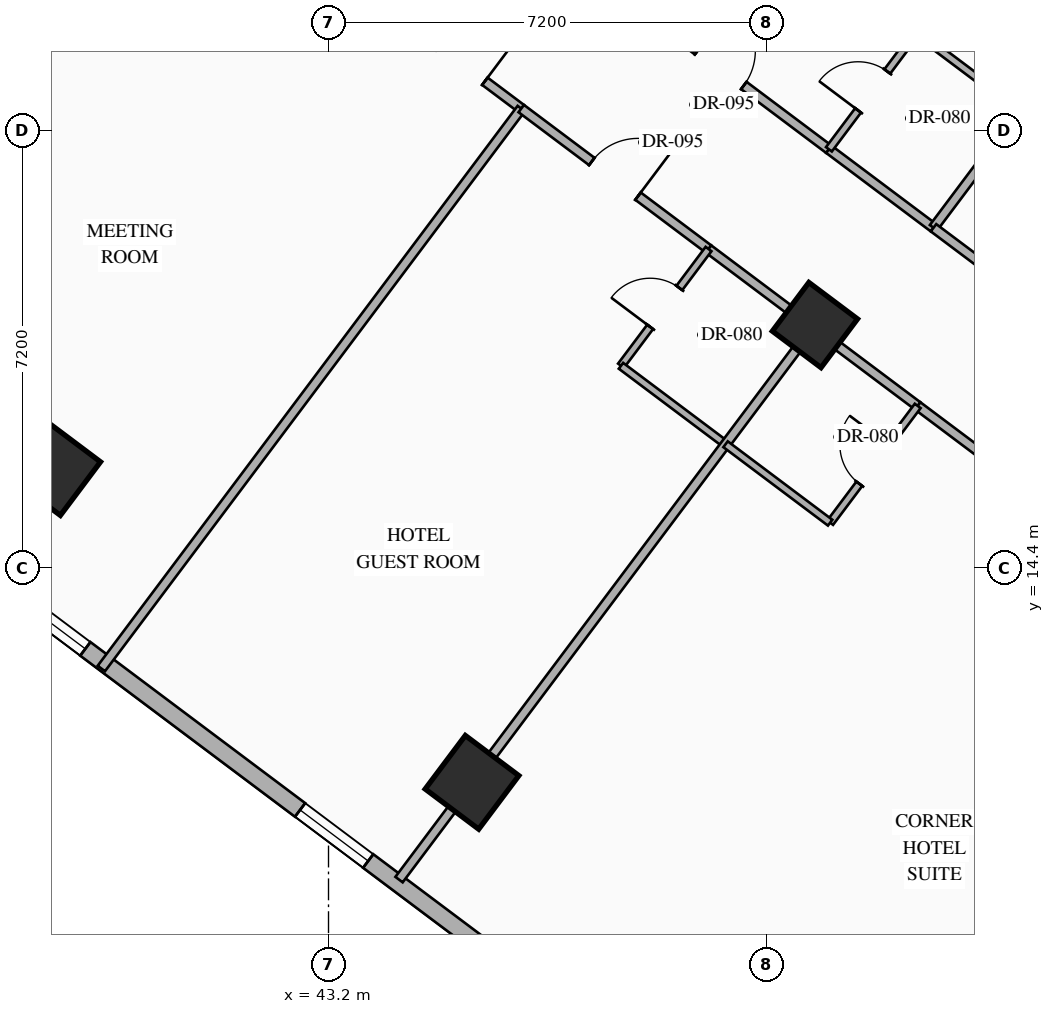
"""IFC4 building model, lengths in metres.
Left out: names, types, materials, properties, quantities, classifications, styles, units other than length and angle.
Written with IfcOpenShell. Run it as: python <this file> out.ifc"""

import sys

from ifc_helpers import new_model, si_unit, direction, frame, frame_2d, origin, origin_2d, place, context, subcontext, project, spatial, rectangle, hollow_rectangle, extrude, element, fill, save


model = new_model("IFC4")
c1 = context("Model", 3, precision=1e-05, world=origin(), true_north=direction((0.0, 1.0)))
c2 = subcontext(c1, "Body", "Model", "MODEL_VIEW")
j1 = project(units=[si_unit("LENGTHUNIT", "METRE"), si_unit("PLANEANGLEUNIT", "RADIAN")], contexts=[c1])
p1 = place(None, origin())
s1 = spatial("IfcSite", under=j1, at=p1, CompositionType="ELEMENT")
p2 = place(p1, origin())
s2 = spatial("IfcBuilding", under=s1, at=p2, CompositionType="ELEMENT")
p3 = place(p2, frame((0.0, 0.0, 39.95)))
s3 = spatial("IfcBuildingStorey", under=s2, at=p3, CompositionType="ELEMENT", Elevation=39.95)
for number, where, z_axis, x_axis in (
    (1, (38.68, 16.04, 0.0), (0.0, 0.0, 1.0), (0.8, -0.6, 0.0)),
    (2, (45.56, 10.88, 0.0), (0.0, 0.0, 1.0), (0.8, -0.6, 0.0)),
):
    element("IfcColumn", number, at=place(p3, frame(where, z_axis=z_axis, x_axis=x_axis)), inside=s3, PredefinedType="COLUMN", context=c2, shape_type="SweptSolid", body=[
        extrude(hollow_rectangle(XDim=1.1, YDim=1.1, WallThickness=0.04, at=origin_2d()), origin(), (0.0, 0.0, 1.0), 3.35),
    ])
p4 = place(p3, frame((51.2, 18.4, 0.0), z_axis=(0.0, 0.0, 1.0), x_axis=(0.799999996291, -0.600000004945, 0.0)))
e3 = element("IfcColumn", 3, at=p4, inside=s3, PredefinedType="COLUMN", context=c2, shape_type="SweptSolid", body=[
    extrude(hollow_rectangle(XDim=1.0, YDim=1.0, WallThickness=0.038, at=origin_2d()), origin(), (0.0, 0.0, 1.0), 3.35),
])
p5 = place(p3, frame((44.86, 40.73, 0.0), z_axis=(0.0, 0.0, 1.0), x_axis=(0.800006902154, -0.599990797017, 0.0)))
e4 = element("IfcWall", 4, at=p5, inside=s3, PredefinedType="STANDARD", context=c2, shape_type="SweptSolid", body=[
    extrude(rectangle(XDim=29.712, YDim=0.28, at=frame_2d((14.856, 0.0))), origin(), (0.0, 0.0, 1.0), 3.13),
])
p6 = place(p5, frame((14.249, 0.0, 0.0)))
e5 = element("IfcOpeningElement", 5, at=p6, cuts=e4, PredefinedType="OPENING", context=c2, shape_type="SweptSolid", body=[
    extrude(rectangle(XDim=1.1, YDim=2.2, at=frame_2d((0.55, 1.1))), frame((0.0, 0.15, 0.0), z_axis=(0.0, -1.0, 0.0), x_axis=(1.0, 0.0, 0.0)), (0.0, 0.0, 1.0), 0.3),
])
p7 = place(p5, frame((1.612, 0.0, 0.85)))
e6 = element("IfcOpeningElement", 6, at=p7, cuts=e4, PredefinedType="OPENING", context=c2, shape_type="SweptSolid", body=[
    extrude(rectangle(XDim=1.4, YDim=1.8, at=frame_2d((0.7, 0.9))), frame((0.0, 0.15, 0.0), z_axis=(0.0, -1.0, 0.0), x_axis=(1.0, 0.0, 0.0)), (0.0, 0.0, 1.0), 0.3),
])
p8 = place(p5, frame((5.667, 0.0, 0.85)))
e7 = element("IfcOpeningElement", 7, at=p8, cuts=e4, PredefinedType="OPENING", context=c2, shape_type="SweptSolid", body=[
    extrude(rectangle(XDim=1.4, YDim=1.8, at=frame_2d((0.7, 0.9))), frame((0.0, 0.15, 0.0), z_axis=(0.0, -1.0, 0.0), x_axis=(1.0, 0.0, 0.0)), (0.0, 0.0, 1.0), 0.3),
])
p9 = place(p5, frame((9.912, 0.0, 0.85)))
e8 = element("IfcOpeningElement", 8, at=p9, cuts=e4, PredefinedType="OPENING", context=c2, shape_type="SweptSolid", body=[
    extrude(rectangle(XDim=1.4, YDim=1.8, at=frame_2d((0.7, 0.9))), frame((0.0, 0.15, 0.0), z_axis=(0.0, -1.0, 0.0), x_axis=(1.0, 0.0, 0.0)), (0.0, 0.0, 1.0), 0.3),
])
p10 = place(p5, frame((19.743, 0.0, 0.85)))
e9 = element("IfcOpeningElement", 9, at=p10, cuts=e4, PredefinedType="OPENING", context=c2, shape_type="SweptSolid", body=[
    extrude(rectangle(XDim=1.4, YDim=1.8, at=frame_2d((0.7, 0.9))), frame((0.0, 0.15, 0.0), z_axis=(0.0, -1.0, 0.0), x_axis=(1.0, 0.0, 0.0)), (0.0, 0.0, 1.0), 0.3),
])
p11 = place(p5, frame((22.645, 0.0, 0.85)))
e10 = element("IfcOpeningElement", 10, at=p11, cuts=e4, PredefinedType="OPENING", context=c2, shape_type="SweptSolid", body=[
    extrude(rectangle(XDim=1.4, YDim=1.8, at=frame_2d((0.7, 0.9))), frame((0.0, 0.15, 0.0), z_axis=(0.0, -1.0, 0.0), x_axis=(1.0, 0.0, 0.0)), (0.0, 0.0, 1.0), 0.3),
])
p12 = place(p5, frame((26.7, 0.0, 0.85)))
e11 = element("IfcOpeningElement", 11, at=p12, cuts=e4, PredefinedType="OPENING", context=c2, shape_type="SweptSolid", body=[
    extrude(rectangle(XDim=1.4, YDim=1.8, at=frame_2d((0.7, 0.9))), frame((0.0, 0.15, 0.0), z_axis=(0.0, -1.0, 0.0), x_axis=(1.0, 0.0, 0.0)), (0.0, 0.0, 1.0), 0.3),
])
p13 = place(p3, frame((53.318, 2.487, 0.0), z_axis=(0.0, 0.0, 1.0), x_axis=(-0.800004174678, 0.599994433723, 0.0)))
e12 = element("IfcWall", 12, at=p13, inside=s3, PredefinedType="STANDARD", context=c2, shape_type="SweptSolid", body=[
    extrude(rectangle(XDim=35.089, YDim=0.28, at=frame_2d((17.544, 0.0))), origin(), (0.0, 0.0, 1.0), 3.13),
])
p14 = place(p13, frame((1.931, 0.0, 0.85)))
e13 = element("IfcOpeningElement", 13, at=p14, cuts=e12, PredefinedType="OPENING", context=c2, shape_type="SweptSolid", body=[
    extrude(rectangle(XDim=1.4, YDim=1.8, at=frame_2d((0.7, 0.9))), frame((0.0, 0.15, 0.0), z_axis=(0.0, -1.0, 0.0), x_axis=(1.0, 0.0, 0.0)), (0.0, 0.0, 1.0), 0.3),
])
p15 = place(p13, frame((6.819, 0.0, 0.85)))
e14 = element("IfcOpeningElement", 14, at=p15, cuts=e12, PredefinedType="OPENING", context=c2, shape_type="SweptSolid", body=[
    extrude(rectangle(XDim=1.4, YDim=1.8, at=frame_2d((0.7, 0.9))), frame((0.0, 0.15, 0.0), z_axis=(0.0, -1.0, 0.0), x_axis=(1.0, 0.0, 0.0)), (0.0, 0.0, 1.0), 0.3),
])
p16 = place(p13, frame((11.832, 0.0, 0.85)))
e15 = element("IfcOpeningElement", 15, at=p16, cuts=e12, PredefinedType="OPENING", context=c2, shape_type="SweptSolid", body=[
    extrude(rectangle(XDim=1.4, YDim=1.8, at=frame_2d((0.7, 0.9))), frame((0.0, 0.15, 0.0), z_axis=(0.0, -1.0, 0.0), x_axis=(1.0, 0.0, 0.0)), (0.0, 0.0, 1.0), 0.3),
])
p17 = place(p13, frame((17.647, 0.0, 0.85)))
e16 = element("IfcOpeningElement", 16, at=p17, cuts=e12, PredefinedType="OPENING", context=c2, shape_type="SweptSolid", body=[
    extrude(rectangle(XDim=1.4, YDim=1.8, at=frame_2d((0.7, 0.9))), frame((0.0, 0.15, 0.0), z_axis=(0.0, -1.0, 0.0), x_axis=(1.0, 0.0, 0.0)), (0.0, 0.0, 1.0), 0.3),
])
p18 = place(p13, frame((21.857, 0.0, 0.85)))
e17 = element("IfcOpeningElement", 17, at=p18, cuts=e12, PredefinedType="OPENING", context=c2, shape_type="SweptSolid", body=[
    extrude(rectangle(XDim=1.4, YDim=1.8, at=frame_2d((0.7, 0.9))), frame((0.0, 0.15, 0.0), z_axis=(0.0, -1.0, 0.0), x_axis=(1.0, 0.0, 0.0)), (0.0, 0.0, 1.0), 0.3),
])
p19 = place(p13, frame((26.87, 0.0, 0.85)))
e18 = element("IfcOpeningElement", 18, at=p19, cuts=e12, PredefinedType="OPENING", context=c2, shape_type="SweptSolid", body=[
    extrude(rectangle(XDim=1.4, YDim=1.8, at=frame_2d((0.7, 0.9))), frame((0.0, 0.15, 0.0), z_axis=(0.0, -1.0, 0.0), x_axis=(1.0, 0.0, 0.0)), (0.0, 0.0, 1.0), 0.3),
])
p20 = place(p13, frame((31.757, 0.0, 0.85)))
e19 = element("IfcOpeningElement", 19, at=p20, cuts=e12, PredefinedType="OPENING", context=c2, shape_type="SweptSolid", body=[
    extrude(rectangle(XDim=1.4, YDim=1.8, at=frame_2d((0.7, 0.9))), frame((0.0, 0.15, 0.0), z_axis=(0.0, -1.0, 0.0), x_axis=(1.0, 0.0, 0.0)), (0.0, 0.0, 1.0), 0.3),
])
p21 = place(p3, frame((43.037, 24.46, 0.0), z_axis=(0.0, 0.0, 1.0), x_axis=(0.799971872363, -0.600037501685, 0.0)))
e20 = element("IfcWall", 20, at=p21, inside=s3, PredefinedType="PARTITIONING", context=c2, shape_type="SweptSolid", body=[
    extrude(rectangle(XDim=4.167, YDim=0.15, at=frame_2d((2.083, 0.0))), origin(), (0.0, 0.0, 1.0), 2.425),
])
p22 = place(p21, frame((2.468, 0.0, 0.0)))
e21 = element("IfcOpeningElement", 21, at=p22, cuts=e20, PredefinedType="OPENING", context=c2, shape_type="SweptSolid", body=[
    extrude(rectangle(XDim=0.95, YDim=2.15, at=frame_2d((0.475, 1.075))), frame((0.0, 0.085, 0.0), z_axis=(0.0, -1.0, 0.0), x_axis=(1.0, 0.0, 0.0)), (0.0, 0.0, 1.0), 0.17),
])
p23 = place(p3, frame((33.384, 17.312, 0.0), z_axis=(0.0, 0.0, 1.0), x_axis=(0.600008743659, 0.799993442181, 0.0)))
e22 = element("IfcWall", 22, at=p23, inside=s3, PredefinedType="PARTITIONING", context=c2, shape_type="SweptSolid", body=[
    extrude(rectangle(XDim=8.935, YDim=0.15, at=frame_2d((4.468, 0.0))), origin(), (0.0, 0.0, 1.0), 3.13),
])
p24 = place(p3, frame((39.464, 12.752, 0.0), z_axis=(0.0, 0.0, 1.0), x_axis=(0.6, 0.8, 0.0)))
e23 = element("IfcWall", 23, at=p24, inside=s3, PredefinedType="PARTITIONING", context=c2, shape_type="SweptSolid", body=[
    extrude(rectangle(XDim=11.51, YDim=0.15, at=frame_2d((5.755, 0.0))), origin(), (0.0, 0.0, 1.0), 3.13),
])
p25 = place(p3, frame((47.87, 23.96, 0.0), z_axis=(0.0, 0.0, 1.0), x_axis=(0.799993416095, -0.600008778439, 0.0)))
e24 = element("IfcWall", 24, at=p25, inside=s3, PredefinedType="PARTITIONING", context=c2, shape_type="SweptSolid", body=[
    extrude(rectangle(XDim=4.45, YDim=0.15, at=frame_2d((2.225, 0.0))), origin(), (0.0, 0.0, 1.0), 2.775),
])
p26 = place(p25, frame((1.75, 0.0, 0.0)))
e25 = element("IfcOpeningElement", 25, at=p26, cuts=e24, PredefinedType="OPENING", context=c2, shape_type="SweptSolid", body=[
    extrude(rectangle(XDim=0.95, YDim=2.15, at=frame_2d((0.475, 1.075))), frame((0.0, 0.085, 0.0), z_axis=(0.0, -1.0, 0.0), x_axis=(1.0, 0.0, 0.0)), (0.0, 0.0, 1.0), 0.17),
])
p27 = place(p3, frame((51.43, 21.29, 0.0), z_axis=(0.0, 0.0, 1.0), x_axis=(0.79998637334, -0.60001816845, 0.0)))
e26 = element("IfcWall", 26, at=p27, inside=s3, PredefinedType="PARTITIONING", context=c2, shape_type="SweptSolid", body=[
    extrude(rectangle(XDim=2.15, YDim=0.15, at=frame_2d((1.075, 0.0))), origin(), (0.0, 0.0, 1.0), 2.775),
])
p28 = place(p3, frame((51.43, 21.29, 0.0), z_axis=(0.0, 0.0, 1.0), x_axis=(0.600065100855, 0.79995117022, 0.0)))
e27 = element("IfcWall", 27, at=p28, inside=s3, PredefinedType="PARTITIONING", context=c2, shape_type="SweptSolid", body=[
    extrude(rectangle(XDim=2.4, YDim=0.12, at=frame_2d((1.2, 0.0))), origin(), (0.0, 0.0, 1.0), 3.13),
])
p29 = place(p28, frame((0.8, 0.0, 0.0)))
e28 = element("IfcOpeningElement", 28, at=p29, cuts=e27, PredefinedType="OPENING", context=c2, shape_type="SweptSolid", body=[
    extrude(rectangle(XDim=0.8, YDim=2.06, at=frame_2d((0.4, 1.03))), frame((0.0, 0.07, 0.0), z_axis=(0.0, -1.0, 0.0), x_axis=(1.0, 0.0, 0.0)), (0.0, 0.0, 1.0), 0.14),
])
p30 = place(p3, frame((52.87, 23.21, 0.0), z_axis=(0.0, 0.0, 1.0), x_axis=(0.79998637334, -0.60001816845, 0.0)))
e29 = element("IfcWall", 29, at=p30, inside=s3, PredefinedType="PARTITIONING", context=c2, shape_type="SweptSolid", body=[
    extrude(rectangle(XDim=2.15, YDim=0.12, at=frame_2d((1.075, 0.0))), origin(), (0.0, 0.0, 1.0), 3.13),
])
p31 = place(p3, frame((53.15, 20.0, 0.0), z_axis=(0.0, 0.0, 1.0), x_axis=(0.60001014597, 0.799992390422, 0.0)))
e30 = element("IfcWall", 30, at=p31, inside=s3, PredefinedType="PARTITIONING", context=c2, shape_type="SweptSolid", body=[
    extrude(rectangle(XDim=11.55, YDim=0.15, at=frame_2d((5.775, 0.0))), origin(), (0.0, 0.0, 1.0), 3.13),
])
p32 = place(p3, frame((53.15, 20.0, 0.0), z_axis=(0.0, 0.0, 1.0), x_axis=(0.800013166942, -0.599982443676, 0.0)))
e31 = element("IfcWall", 31, at=p32, inside=s3, PredefinedType="PARTITIONING", context=c2, shape_type="SweptSolid", body=[
    extrude(rectangle(XDim=4.45, YDim=0.15, at=frame_2d((2.225, 0.0))), origin(), (0.0, 0.0, 1.0), 2.775),
])
p33 = place(p32, frame((1.75, 0.0, 0.0)))
e32 = element("IfcOpeningElement", 32, at=p33, cuts=e31, PredefinedType="OPENING", context=c2, shape_type="SweptSolid", body=[
    extrude(rectangle(XDim=0.95, YDim=2.15, at=frame_2d((0.475, 1.075))), frame((0.0, 0.085, 0.0), z_axis=(0.0, -1.0, 0.0), x_axis=(1.0, 0.0, 0.0)), (0.0, 0.0, 1.0), 0.17),
])
p34 = place(p3, frame((46.37, 21.96, 0.0), z_axis=(0.0, 0.0, 1.0), x_axis=(0.799977170108, -0.600030438649, 0.0)))
e33 = element("IfcWall", 33, at=p34, inside=s3, PredefinedType="PARTITIONING", context=c2, shape_type="SweptSolid", body=[
    extrude(rectangle(XDim=3.85, YDim=0.15, at=frame_2d((1.925, 0.0))), origin(), (0.0, 0.0, 1.0), 2.425),
])
p35 = place(p34, frame((1.45, 0.0, 0.0)))
e34 = element("IfcOpeningElement", 34, at=p35, cuts=e33, PredefinedType="OPENING", context=c2, shape_type="SweptSolid", body=[
    extrude(rectangle(XDim=0.95, YDim=2.15, at=frame_2d((0.475, 1.075))), frame((0.0, 0.085, 0.0), z_axis=(0.0, -1.0, 0.0), x_axis=(1.0, 0.0, 0.0)), (0.0, 0.0, 1.0), 0.17),
])
p36 = place(p3, frame((49.45, 19.65, 0.0), z_axis=(0.0, 0.0, 1.0), x_axis=(0.800040880289, -0.59994548908, 0.0)))
e35 = element("IfcWall", 35, at=p36, inside=s3, PredefinedType="PARTITIONING", context=c2, shape_type="SweptSolid", body=[
    extrude(rectangle(XDim=2.15, YDim=0.15, at=frame_2d((1.075, 0.0))), origin(), (0.0, 0.0, 1.0), 2.425),
])
p37 = place(p3, frame((48.01, 17.73, 0.0), z_axis=(0.0, 0.0, 1.0), x_axis=(0.6, 0.8, 0.0)))
e36 = element("IfcWall", 36, at=p37, inside=s3, PredefinedType="PARTITIONING", context=c2, shape_type="SweptSolid", body=[
    extrude(rectangle(XDim=2.4, YDim=0.12, at=frame_2d((1.2, 0.0))), origin(), (0.0, 0.0, 1.0), 3.13),
])
p38 = place(p37, frame((0.8, 0.0, 0.0)))
e37 = element("IfcOpeningElement", 37, at=p38, cuts=e36, PredefinedType="OPENING", context=c2, shape_type="SweptSolid", body=[
    extrude(rectangle(XDim=0.8, YDim=2.06, at=frame_2d((0.4, 1.03))), frame((0.0, 0.07, 0.0), z_axis=(0.0, -1.0, 0.0), x_axis=(1.0, 0.0, 0.0)), (0.0, 0.0, 1.0), 0.14),
])
p39 = place(p3, frame((48.01, 17.73, 0.0), z_axis=(0.0, 0.0, 1.0), x_axis=(0.79998637334, -0.60001816845, 0.0)))
e38 = element("IfcWall", 38, at=p39, inside=s3, PredefinedType="PARTITIONING", context=c2, shape_type="SweptSolid", body=[
    extrude(rectangle(XDim=2.15, YDim=0.12, at=frame_2d((1.075, 0.0))), origin(), (0.0, 0.0, 1.0), 3.13),
])
p40 = place(p3, frame((44.36, 9.28, 0.0), z_axis=(0.0, 0.0, 1.0), x_axis=(0.599986233332, 0.800010324816, 0.0)))
e39 = element("IfcWall", 39, at=p40, inside=s3, PredefinedType="PARTITIONING", context=c2, shape_type="SweptSolid", body=[
    extrude(rectangle(XDim=11.35, YDim=0.15, at=frame_2d((5.675, 0.0))), origin(), (0.0, 0.0, 1.0), 2.425),
])
p41 = place(p3, frame((51.17, 18.36, 0.0), z_axis=(0.0, 0.0, 1.0), x_axis=(0.79998637334, -0.60001816845, 0.0)))
e40 = element("IfcWall", 40, at=p41, inside=s3, PredefinedType="PARTITIONING", context=c2, shape_type="SweptSolid", body=[
    extrude(rectangle(XDim=2.15, YDim=0.15, at=frame_2d((1.075, 0.0))), origin(), (0.0, 0.0, 1.0), 2.425),
])
p42 = place(p3, frame((52.89, 17.07, 0.0), z_axis=(0.0, 0.0, 1.0), x_axis=(0.8, -0.6, 0.0)))
e41 = element("IfcWall", 41, at=p42, inside=s3, PredefinedType="PARTITIONING", context=c2, shape_type="SweptSolid", body=[
    extrude(rectangle(XDim=11.51, YDim=0.15, at=frame_2d((5.755, 0.0))), origin(), (0.0, 0.0, 1.0), 2.425),
])
p43 = place(p42, frame((5.28, 0.0, 0.0)))
e42 = element("IfcOpeningElement", 42, at=p43, cuts=e41, PredefinedType="OPENING", context=c2, shape_type="SweptSolid", body=[
    extrude(rectangle(XDim=0.95, YDim=2.15, at=frame_2d((0.475, 1.075))), frame((0.0, 0.085, 0.0), z_axis=(0.0, -1.0, 0.0), x_axis=(1.0, 0.0, 0.0)), (0.0, 0.0, 1.0), 0.17),
])
p44 = place(p3, frame((51.45, 15.15, 0.0), z_axis=(0.0, 0.0, 1.0), x_axis=(0.599951172744, 0.800036618114, 0.0)))
e43 = element("IfcWall", 43, at=p44, inside=s3, PredefinedType="PARTITIONING", context=c2, shape_type="SweptSolid", body=[
    extrude(rectangle(XDim=2.4, YDim=0.12, at=frame_2d((1.2, 0.0))), origin(), (0.0, 0.0, 1.0), 3.13),
])
p45 = place(p44, frame((0.8, 0.0, 0.0)))
e44 = element("IfcOpeningElement", 44, at=p45, cuts=e43, PredefinedType="OPENING", context=c2, shape_type="SweptSolid", body=[
    extrude(rectangle(XDim=0.8, YDim=2.06, at=frame_2d((0.4, 1.03))), frame((0.0, 0.07, 0.0), z_axis=(0.0, -1.0, 0.0), x_axis=(1.0, 0.0, 0.0)), (0.0, 0.0, 1.0), 0.14),
])
p46 = place(p3, frame((49.73, 16.44, 0.0), z_axis=(0.0, 0.0, 1.0), x_axis=(0.79998637334, -0.60001816845, 0.0)))
e45 = element("IfcWall", 45, at=p46, inside=s3, PredefinedType="PARTITIONING", context=c2, shape_type="SweptSolid", body=[
    extrude(rectangle(XDim=2.15, YDim=0.12, at=frame_2d((1.075, 0.0))), origin(), (0.0, 0.0, 1.0), 3.13),
])
p47 = place(p16, origin())
e46 = element("IfcWindow", 46, at=p47, inside=s3, PartitioningType="SINGLE_PANEL", PredefinedType="WINDOW", context=c2, shape_type="SweptSolid", body=[
    extrude(rectangle(XDim=1.4, YDim=1.8, at=frame_2d((0.7, 0.9))), frame((0.0, 0.03, 0.0), z_axis=(0.0, -1.0, 0.0), x_axis=(1.0, 0.0, 0.0)), (0.0, 0.0, 1.0), 0.06),
])
fill(e15, e46)
p48 = place(p17, origin())
e47 = element("IfcWindow", 47, at=p48, inside=s3, PartitioningType="SINGLE_PANEL", PredefinedType="WINDOW", context=c2, shape_type="SweptSolid", body=[
    extrude(rectangle(XDim=1.4, YDim=1.8, at=frame_2d((0.7, 0.9))), frame((0.0, 0.03, 0.0), z_axis=(0.0, -1.0, 0.0), x_axis=(1.0, 0.0, 0.0)), (0.0, 0.0, 1.0), 0.06),
])
fill(e16, e47)
p49 = place(p22, origin())
e48 = element("IfcDoor", 48, at=p49, inside=s3, OperationType="SINGLE_SWING_RIGHT", PredefinedType="DOOR", context=c2, shape_type="SweptSolid", body=[
    extrude(rectangle(XDim=0.95, YDim=2.15, at=frame_2d((0.475, 1.075))), frame((0.0, 0.025, 0.0), z_axis=(0.0, -1.0, 0.0), x_axis=(1.0, 0.0, 0.0)), (0.0, 0.0, 1.0), 0.05),
])
fill(e21, e48)
p50 = place(p26, origin())
e49 = element("IfcDoor", 49, at=p50, inside=s3, OperationType="SINGLE_SWING_LEFT", PredefinedType="DOOR", context=c2, shape_type="SweptSolid", body=[
    extrude(rectangle(XDim=0.95, YDim=2.15, at=frame_2d((0.475, 1.075))), frame((0.0, 0.025, 0.0), z_axis=(0.0, -1.0, 0.0), x_axis=(1.0, 0.0, 0.0)), (0.0, 0.0, 1.0), 0.05),
])
fill(e25, e49)
p51 = place(p29, origin())
e50 = element("IfcDoor", 50, at=p51, inside=s3, OperationType="SINGLE_SWING_LEFT", PredefinedType="DOOR", context=c2, shape_type="SweptSolid", body=[
    extrude(rectangle(XDim=0.8, YDim=2.06, at=frame_2d((0.4, 1.03))), frame((0.0, 0.025, 0.0), z_axis=(0.0, -1.0, 0.0), x_axis=(1.0, 0.0, 0.0)), (0.0, 0.0, 1.0), 0.05),
])
fill(e28, e50)
p52 = place(p35, origin())
e51 = element("IfcDoor", 51, at=p52, inside=s3, OperationType="SINGLE_SWING_RIGHT", PredefinedType="DOOR", context=c2, shape_type="SweptSolid", body=[
    extrude(rectangle(XDim=0.95, YDim=2.15, at=frame_2d((0.475, 1.075))), frame((0.0, 0.025, 0.0), z_axis=(0.0, -1.0, 0.0), x_axis=(1.0, 0.0, 0.0)), (0.0, 0.0, 1.0), 0.05),
])
fill(e34, e51)
p53 = place(p38, origin())
e52 = element("IfcDoor", 52, at=p53, inside=s3, OperationType="SINGLE_SWING_LEFT", PredefinedType="DOOR", context=c2, shape_type="SweptSolid", body=[
    extrude(rectangle(XDim=0.8, YDim=2.06, at=frame_2d((0.4, 1.03))), frame((0.0, 0.025, 0.0), z_axis=(0.0, -1.0, 0.0), x_axis=(1.0, 0.0, 0.0)), (0.0, 0.0, 1.0), 0.05),
])
fill(e37, e52)
p54 = place(p45, origin())
e53 = element("IfcDoor", 53, at=p54, inside=s3, OperationType="SINGLE_SWING_RIGHT", PredefinedType="DOOR", context=c2, shape_type="SweptSolid", body=[
    extrude(rectangle(XDim=0.8, YDim=2.06, at=frame_2d((0.4, 1.03))), frame((0.0, 0.025, 0.0), z_axis=(0.0, -1.0, 0.0), x_axis=(1.0, 0.0, 0.0)), (0.0, 0.0, 1.0), 0.05),
])
fill(e44, e53)
save(model, sys.argv[1])
